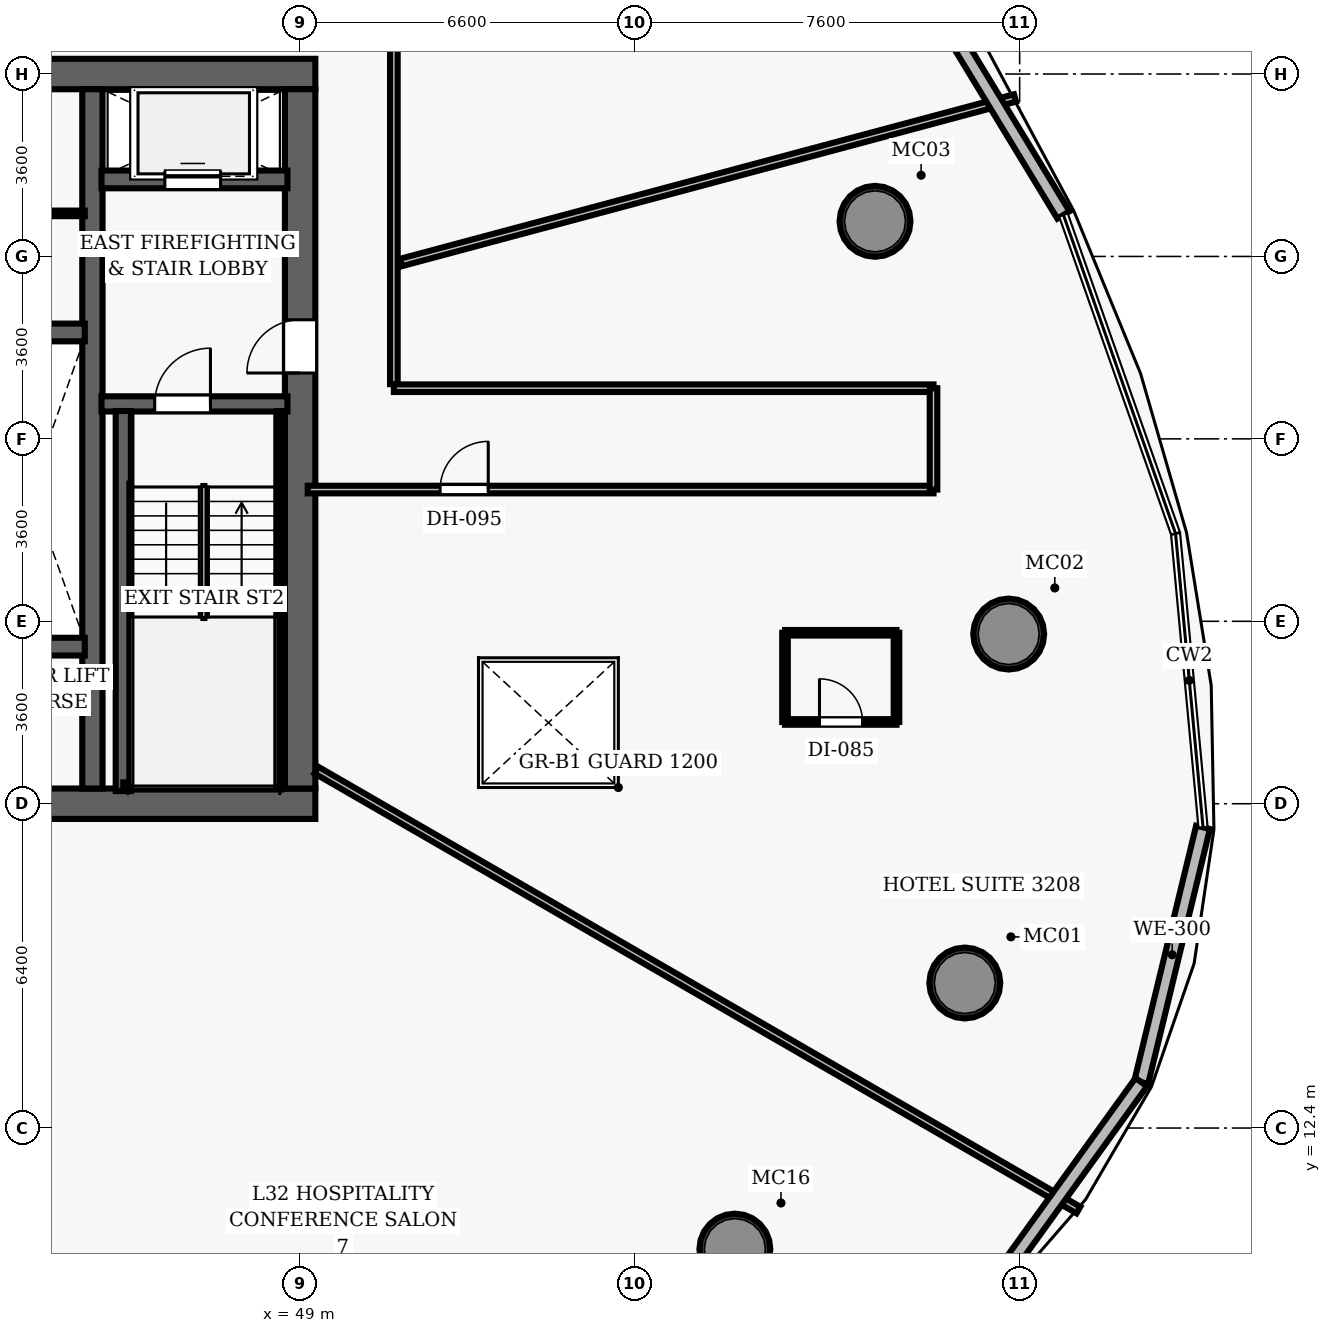
"""IFC4 building model, lengths in metres.
Left out: names, types, materials, properties, quantities, classifications, styles, units other than length and angle.
Written with IfcOpenShell. Run it as: python <this file> out.ifc"""

import sys

from ifc_helpers import new_model, si_unit, direction, frame, frame_2d, origin, origin_2d, place, context, subcontext, project, spatial, rectangle, hollow_circle, extrude, element, fill, save


model = new_model("IFC4")
c1 = context("Model", 3, precision=1e-05, world=origin(), true_north=direction((0.0, 1.0)))
c2 = subcontext(c1, "Body", "Model", "MODEL_VIEW")
j1 = project(units=[si_unit("LENGTHUNIT", "METRE"), si_unit("PLANEANGLEUNIT", "RADIAN")], contexts=[c1])
p1 = place(None, origin())
s1 = spatial("IfcSite", under=j1, at=p1, CompositionType="ELEMENT")
p2 = place(p1, origin())
s2 = spatial("IfcBuilding", under=s1, at=p2, CompositionType="ELEMENT")
p3 = place(p2, frame((0.0, 0.0, 130.8)))
s3 = spatial("IfcBuildingStorey", under=s2, at=p3, CompositionType="ELEMENT", Elevation=130.8)
p4 = place(p3, frame((26.7, 18.8, 0.0), z_axis=(0.0, 0.0, 1.0), x_axis=(1.0, 0.0, 0.0)))
e1 = element("IfcWall", 1, at=p4, inside=s3, PredefinedType="SHEAR", context=c2, shape_type="SweptSolid", body=[
    extrude(rectangle(XDim=22.6, YDim=0.6, at=frame_2d((11.3, 0.0))), origin(), (0.0, 0.0, 1.0), 3.5),
])
p5 = place(p4, frame((14.52, 0.0, 0.0)))
e2 = element("IfcOpeningElement", 2, at=p5, cuts=e1, PredefinedType="OPENING", context=c2, shape_type="SweptSolid", body=[
    extrude(rectangle(XDim=1.05, YDim=2.15, at=frame_2d((0.525, 1.075))), frame((0.0, 0.31, 0.0), z_axis=(0.0, -1.0, 0.0), x_axis=(1.0, 0.0, 0.0)), (0.0, 0.0, 1.0), 0.62),
])
p6 = place(p3, frame((26.7, 33.2, 0.0), z_axis=(0.0, 0.0, 1.0), x_axis=(1.0, 0.0, 0.0)))
e3 = element("IfcWall", 3, at=p6, inside=s3, PredefinedType="SHEAR", context=c2, shape_type="SweptSolid", body=[
    extrude(rectangle(XDim=22.6, YDim=0.6, at=frame_2d((11.3, 0.0))), origin(), (0.0, 0.0, 1.0), 3.5),
])
p7 = place(p6, frame((4.62, 0.0, 0.0)))
e4 = element("IfcOpeningElement", 4, at=p7, cuts=e3, PredefinedType="OPENING", context=c2, shape_type="SweptSolid", body=[
    extrude(rectangle(XDim=1.05, YDim=2.15, at=frame_2d((0.525, 1.075))), frame((0.0, 0.31, 0.0), z_axis=(0.0, -1.0, 0.0), x_axis=(1.0, 0.0, 0.0)), (0.0, 0.0, 1.0), 0.62),
])
p8 = place(p6, frame((14.52, 0.0, 0.0)))
e5 = element("IfcOpeningElement", 5, at=p8, cuts=e3, PredefinedType="OPENING", context=c2, shape_type="SweptSolid", body=[
    extrude(rectangle(XDim=1.05, YDim=2.15, at=frame_2d((0.525, 1.075))), frame((0.0, 0.31, 0.0), z_axis=(0.0, -1.0, 0.0), x_axis=(1.0, 0.0, 0.0)), (0.0, 0.0, 1.0), 0.62),
])
p9 = place(p3, frame((49.0, 19.1, 0.0), z_axis=(0.0, 0.0, 1.0), x_axis=(0.0, 1.0, 0.0)))
e6 = element("IfcWall", 6, at=p9, inside=s3, PredefinedType="SHEAR", context=c2, shape_type="SweptSolid", body=[
    extrude(rectangle(XDim=13.8, YDim=0.6, at=frame_2d((6.9, 0.0))), origin(), (0.0, 0.0, 1.0), 3.5),
])
p10 = place(p9, frame((8.2, 0.0, 0.0)))
e7 = element("IfcOpeningElement", 7, at=p10, cuts=e6, PredefinedType="OPENING", context=c2, shape_type="SweptSolid", body=[
    extrude(rectangle(XDim=1.05, YDim=2.15, at=frame_2d((0.525, 1.075))), frame((0.0, 0.31, 0.0), z_axis=(0.0, -1.0, 0.0), x_axis=(1.0, 0.0, 0.0)), (0.0, 0.0, 1.0), 0.62),
])
p11 = place(p3, frame((44.9, 19.1, 0.0), z_axis=(0.0, 0.0, 1.0), x_axis=(0.0, 1.0, 0.0)))
e8 = element("IfcWall", 8, at=p11, inside=s3, PredefinedType="SHEAR", context=c2, shape_type="SweptSolid", body=[
    extrude(rectangle(XDim=13.8, YDim=0.4, at=frame_2d((6.9, 0.0))), origin(), (0.0, 0.0, 1.0), 3.5),
])
for number, where, z_axis, x_axis in (
    (9, (62.118, 15.262, 0.0), (0.0, 0.0, 1.0), (1.0, 0.0, 0.0)),
    (10, (62.984, 22.148, 0.0), (0.0, 0.0, 1.0), (1.0, 0.0, 0.0)),
    (11, (60.346, 30.293, 0.0), (0.0, 0.0, 1.0), (1.0, 0.0, 0.0)),
    (12, (57.58, 10.011, 0.0), (0.0, 0.0, 1.0), (1.0, 0.0, 0.0)),
):
    element("IfcColumn", number, at=place(p3, frame(where, z_axis=z_axis, x_axis=x_axis)), inside=s3, PredefinedType="COLUMN", context=c2, shape_type="SweptSolid", body=[
        extrude(hollow_circle(Radius=0.7, WallThickness=0.055, at=origin_2d()), origin(), (0.0, 0.0, 1.0), 3.5),
    ])
p12 = place(p3, frame((45.08, 26.69, 0.0), z_axis=(0.0, 0.0, 1.0), x_axis=(1.0, 0.0, 0.0)))
e13 = element("IfcWall", 13, at=p12, inside=s3, PredefinedType="SHEAR", context=c2, shape_type="SweptSolid", body=[
    extrude(rectangle(XDim=3.67, YDim=0.3, at=frame_2d((1.835, 0.0))), origin(), (0.0, 0.0, 1.0), 3.5),
])
p13 = place(p12, frame((1.05, 0.0, 0.0)))
e14 = element("IfcOpeningElement", 14, at=p13, cuts=e13, PredefinedType="OPENING", context=c2, shape_type="SweptSolid", body=[
    extrude(rectangle(XDim=1.1, YDim=2.15, at=frame_2d((0.55, 1.075))), frame((0.0, 0.16, 0.0), z_axis=(0.0, -1.0, 0.0), x_axis=(1.0, 0.0, 0.0)), (0.0, 0.0, 1.0), 0.32),
])
p14 = place(p3, frame((45.51, 19.05, 0.0), z_axis=(0.0, 0.0, 1.0), x_axis=(0.0, 1.0, 0.0)))
e15 = element("IfcWall", 15, at=p14, inside=s3, PredefinedType="SHEAR", context=c2, shape_type="SweptSolid", body=[
    extrude(rectangle(XDim=7.5, YDim=0.3, at=frame_2d((3.75, 0.0))), origin(), (0.0, 0.0, 1.0), 3.5),
])
p15 = place(p3, frame((48.605, 19.1, 0.0), z_axis=(0.0, 0.0, 1.0), x_axis=(0.0, 1.0, 0.0)))
e16 = element("IfcWall", 16, at=p15, inside=s3, PredefinedType="SHEAR", context=c2, shape_type="SweptSolid", body=[
    extrude(rectangle(XDim=7.45, YDim=0.12, at=frame_2d((3.725, 0.0))), origin(), (0.0, 0.0, 1.0), 3.5),
])
p16 = place(p3, frame((45.51, 19.16, 0.0), z_axis=(0.0, 0.0, 1.0), x_axis=(1.0, 0.0, 0.0)))
e17 = element("IfcWall", 17, at=p16, inside=s3, PredefinedType="SHEAR", context=c2, shape_type="SweptSolid", body=[
    extrude(rectangle(XDim=3.095, YDim=0.12, at=frame_2d((1.547, 0.0))), origin(), (0.0, 0.0, 1.0), 3.5),
])
p17 = place(p3, frame((45.08, 31.12, 0.0), z_axis=(0.0, 0.0, 1.0), x_axis=(1.0, 0.0, 0.0)))
e18 = element("IfcWall", 18, at=p17, inside=s3, PredefinedType="SHEAR", context=c2, shape_type="SweptSolid", body=[
    extrude(rectangle(XDim=3.67, YDim=0.35, at=frame_2d((1.835, 0.0))), origin(), (0.0, 0.0, 1.0), 2.675),
])
p18 = place(p17, frame((1.25, 0.0, 0.0)))
e19 = element("IfcOpeningElement", 19, at=p18, cuts=e18, PredefinedType="OPENING", context=c2, shape_type="SweptSolid", body=[
    extrude(rectangle(XDim=1.1, YDim=2.15, at=frame_2d((0.55, 1.075))), frame((0.0, 0.185, 0.0), z_axis=(0.0, -1.0, 0.0), x_axis=(1.0, 0.0, 0.0)), (0.0, 0.0, 1.0), 0.37),
])
for number, where, z_axis, x_axis in (
    (20, (42.72, 21.9, 0.0), (0.0, 0.0, 1.0), (1.0, 0.0, 0.0)),
    (21, (42.72, 28.1, 0.0), (0.0, 0.0, 1.0), (1.0, 0.0, 0.0)),
):
    element("IfcWall", number, at=place(p3, frame(where, z_axis=z_axis, x_axis=x_axis)), inside=s3, PredefinedType="SHEAR", context=c2, shape_type="SweptSolid", body=[
        extrude(rectangle(XDim=2.03, YDim=0.35, at=frame_2d((1.015, 0.0))), origin(), (0.0, 0.0, 1.0), 2.675),
    ])
p19 = place(p3, frame((42.55, 30.45, 0.0), z_axis=(0.0, 0.0, 1.0), x_axis=(1.0, 0.0, 0.0)))
e22 = element("IfcWall", 22, at=p19, inside=s3, PredefinedType="PARTITIONING", context=c2, shape_type="SweptSolid", body=[
    extrude(rectangle(XDim=2.2, YDim=0.11, at=frame_2d((1.1, 0.0))), origin(), (0.0, 0.0, 1.0), 2.675),
])
p20 = place(p3, frame((50.85, 27.08, 0.0), z_axis=(0.0, 0.0, 1.0), x_axis=(0.0, 1.0, 0.0)))
e23 = element("IfcWall", 23, at=p20, inside=s3, PredefinedType="PARTITIONING", context=c2, shape_type="SweptSolid", body=[
    extrude(rectangle(XDim=8.12, YDim=0.15, at=frame_2d((4.06, 0.0))), origin(), (0.0, 0.0, 1.0), 2.675),
])
p21 = place(p3, frame((50.85, 27.0, 0.0), z_axis=(0.0, 0.0, 1.0), x_axis=(1.0, 0.0, 0.0)))
e24 = element("IfcWall", 24, at=p21, inside=s3, PredefinedType="PARTITIONING", context=c2, shape_type="SweptSolid", body=[
    extrude(rectangle(XDim=10.65, YDim=0.15, at=frame_2d((5.325, 0.0))), origin(), (0.0, 0.0, 1.0), 2.675),
])
p22 = place(p3, frame((49.15, 25.0, 0.0), z_axis=(0.0, 0.0, 1.0), x_axis=(1.0, 0.0, 0.0)))
e25 = element("IfcWall", 25, at=p22, inside=s3, PredefinedType="PARTITIONING", context=c2, shape_type="SweptSolid", body=[
    extrude(rectangle(XDim=12.35, YDim=0.15, at=frame_2d((6.175, 0.0))), origin(), (0.0, 0.0, 1.0), 2.675),
])
p23 = place(p22, frame((2.613, 0.0, 0.0)))
e26 = element("IfcOpeningElement", 26, at=p23, cuts=e25, PredefinedType="OPENING", context=c2, shape_type="SweptSolid", body=[
    extrude(rectangle(XDim=0.95, YDim=2.15, at=frame_2d((0.475, 1.075))), frame((0.0, 0.085, 0.0), z_axis=(0.0, -1.0, 0.0), x_axis=(1.0, 0.0, 0.0)), (0.0, 0.0, 1.0), 0.17),
])
p24 = place(p3, frame((61.5, 25.0, 0.0), z_axis=(0.0, 0.0, 1.0), x_axis=(0.0, 1.0, 0.0)))
e27 = element("IfcWall", 27, at=p24, inside=s3, PredefinedType="PARTITIONING", context=c2, shape_type="SweptSolid", body=[
    extrude(rectangle(XDim=2.0, YDim=0.15, at=frame_2d((1.0, 0.0))), origin(), (0.0, 0.0, 1.0), 2.675),
])
p25 = place(p3, frame((50.99, 29.481, 0.0), z_axis=(0.0, 0.0, 1.0), x_axis=(0.965924163202, 0.258825251749, 0.0)))
e28 = element("IfcWall", 28, at=p25, inside=s3, PredefinedType="PARTITIONING", context=c2, shape_type="SweptSolid", body=[
    extrude(rectangle(XDim=12.545, YDim=0.15, at=frame_2d((6.273, 0.0))), origin(), (0.0, 0.0, 1.0), 2.675),
])
p26 = place(p3, frame((40.543, 16.51, 0.0), z_axis=(0.0, 0.0, 1.0), x_axis=(0.258823752986, -0.965924564803, 0.0)))
e29 = element("IfcWall", 29, at=p26, inside=s3, PredefinedType="PARTITIONING", context=c2, shape_type="SweptSolid", body=[
    extrude(rectangle(XDim=15.126, YDim=0.15, at=frame_2d((7.563, 0.0))), origin(), (0.0, 0.0, 1.0), 2.675),
])
p27 = place(p3, frame((49.32, 19.464, 0.0), z_axis=(0.0, 0.0, 1.0), x_axis=(0.86602498547, -0.500000724542, 0.0)))
e30 = element("IfcWall", 30, at=p27, inside=s3, PredefinedType="PARTITIONING", context=c2, shape_type="SweptSolid", body=[
    extrude(rectangle(XDim=17.366, YDim=0.15, at=frame_2d((8.683, 0.0))), origin(), (0.0, 0.0, 1.0), 2.675),
])
p28 = place(p3, frame((58.569, 20.414, 0.0), z_axis=(0.0, 0.0, 1.0), x_axis=(1.0, 0.0, 0.0)))
e31 = element("IfcWall", 31, at=p28, inside=s3, PredefinedType="PARTITIONING", context=c2, shape_type="SweptSolid", body=[
    extrude(rectangle(XDim=2.2, YDim=0.11, at=frame_2d((1.1, 0.0))), origin(), (0.0, 0.0, 1.0), 2.675),
])
p29 = place(p28, frame((0.68, 0.0, 0.0)))
e32 = element("IfcOpeningElement", 32, at=p29, cuts=e31, PredefinedType="OPENING", context=c2, shape_type="SweptSolid", body=[
    extrude(rectangle(XDim=0.85, YDim=2.1, at=frame_2d((0.425, 1.05))), frame((0.0, 0.065, 0.0), z_axis=(0.0, -1.0, 0.0), x_axis=(1.0, 0.0, 0.0)), (0.0, 0.0, 1.0), 0.13),
])
p30 = place(p3, frame((58.569, 22.174, 0.0), z_axis=(0.0, 0.0, 1.0), x_axis=(1.0, 0.0, 0.0)))
e33 = element("IfcWall", 33, at=p30, inside=s3, PredefinedType="PARTITIONING", context=c2, shape_type="SweptSolid", body=[
    extrude(rectangle(XDim=2.2, YDim=0.11, at=frame_2d((1.1, 0.0))), origin(), (0.0, 0.0, 1.0), 2.675),
])
for number, where, z_axis, x_axis in (
    (34, (58.569, 20.414, 0.0), (0.0, 0.0, 1.0), (0.0, 1.0, 0.0)),
    (35, (60.769, 20.414, 0.0), (0.0, 0.0, 1.0), (0.0, 1.0, 0.0)),
):
    element("IfcWall", number, at=place(p3, frame(where, z_axis=z_axis, x_axis=x_axis)), inside=s3, PredefinedType="PARTITIONING", context=c2, shape_type="SweptSolid", body=[
        extrude(rectangle(XDim=1.76, YDim=0.11, at=frame_2d((0.88, 0.0))), origin(), (0.0, 0.0, 1.0), 2.675),
    ])
p31 = place(p3, frame((66.819, 18.334, 0.0), z_axis=(0.0, 0.0, 1.0), x_axis=(-0.235490639643, -0.971876616984, 0.0)))
e36 = element("IfcWall", 36, at=p31, inside=s3, PredefinedType="SOLIDWALL", context=c2, shape_type="SweptSolid", body=[
    extrude(rectangle(XDim=5.174, YDim=0.28, at=frame_2d((2.587, 0.0))), origin(), (0.0, 0.0, 1.0), 3.26),
])
p32 = place(p3, frame((60.279, 36.651, 0.0), z_axis=(0.0, 0.0, 1.0), x_axis=(0.519136267089, -0.854691485972, 0.0)))
e37 = element("IfcWall", 37, at=p32, inside=s3, PredefinedType="SOLIDWALL", context=c2, shape_type="SweptSolid", body=[
    extrude(rectangle(XDim=7.292, YDim=0.28, at=frame_2d((3.646, 0.0))), origin(), (0.0, 0.0, 1.0), 3.26),
])
p33 = place(p3, frame((65.601, 13.305, 0.0), z_axis=(0.0, 0.0, 1.0), x_axis=(-0.584687491666, -0.811258612952, 0.0)))
e38 = element("IfcWall", 38, at=p33, inside=s3, PredefinedType="SOLIDWALL", context=c2, shape_type="SweptSolid", body=[
    extrude(rectangle(XDim=5.174, YDim=0.28, at=frame_2d((2.587, 0.0))), origin(), (0.0, 0.0, 1.0), 3.26),
])
p34 = place(p13, origin())
e39 = element("IfcDoor", 39, at=p34, inside=s3, OperationType="SINGLE_SWING_RIGHT", PredefinedType="DOOR", context=c2, shape_type="SweptSolid", body=[
    extrude(rectangle(XDim=1.1, YDim=2.15, at=frame_2d((0.55, 1.075))), frame((0.0, 0.025, 0.0), z_axis=(0.0, -1.0, 0.0), x_axis=(1.0, 0.0, 0.0)), (0.0, 0.0, 1.0), 0.05),
])
fill(e14, e39)
p35 = place(p10, origin())
e40 = element("IfcDoor", 40, at=p35, inside=s3, OperationType="SINGLE_SWING_LEFT", PredefinedType="DOOR", context=c2, shape_type="SweptSolid", body=[
    extrude(rectangle(XDim=1.05, YDim=2.15, at=frame_2d((0.525, 1.075))), frame((0.0, 0.025, 0.0), z_axis=(0.0, -1.0, 0.0), x_axis=(1.0, 0.0, 0.0)), (0.0, 0.0, 1.0), 0.05),
])
fill(e7, e40)
p36 = place(p23, origin())
e41 = element("IfcDoor", 41, at=p36, inside=s3, OperationType="SINGLE_SWING_RIGHT", PredefinedType="DOOR", context=c2, shape_type="SweptSolid", body=[
    extrude(rectangle(XDim=0.95, YDim=2.15, at=frame_2d((0.475, 1.075))), frame((0.0, 0.025, 0.0), z_axis=(0.0, -1.0, 0.0), x_axis=(1.0, 0.0, 0.0)), (0.0, 0.0, 1.0), 0.05),
])
fill(e26, e41)
p37 = place(p29, origin())
e42 = element("IfcDoor", 42, at=p37, inside=s3, OperationType="SINGLE_SWING_LEFT", PredefinedType="DOOR", context=c2, shape_type="SweptSolid", body=[
    extrude(rectangle(XDim=0.85, YDim=2.1, at=frame_2d((0.425, 1.05))), frame((0.0, 0.025, 0.0), z_axis=(0.0, -1.0, 0.0), x_axis=(1.0, 0.0, 0.0)), (0.0, 0.0, 1.0), 0.05),
])
fill(e32, e42)
p38 = place(p18, origin())
e43 = element("IfcDoor", 43, at=p38, inside=s3, OperationType="SLIDING_TO_LEFT", PredefinedType="DOOR", context=c2, shape_type="SweptSolid", body=[
    extrude(rectangle(XDim=1.1, YDim=2.15, at=frame_2d((0.55, 1.075))), frame((0.0, 0.025, 0.0), z_axis=(0.0, -1.0, 0.0), x_axis=(1.0, 0.0, 0.0)), (0.0, 0.0, 1.0), 0.05),
])
fill(e19, e43)
save(model, sys.argv[1])
